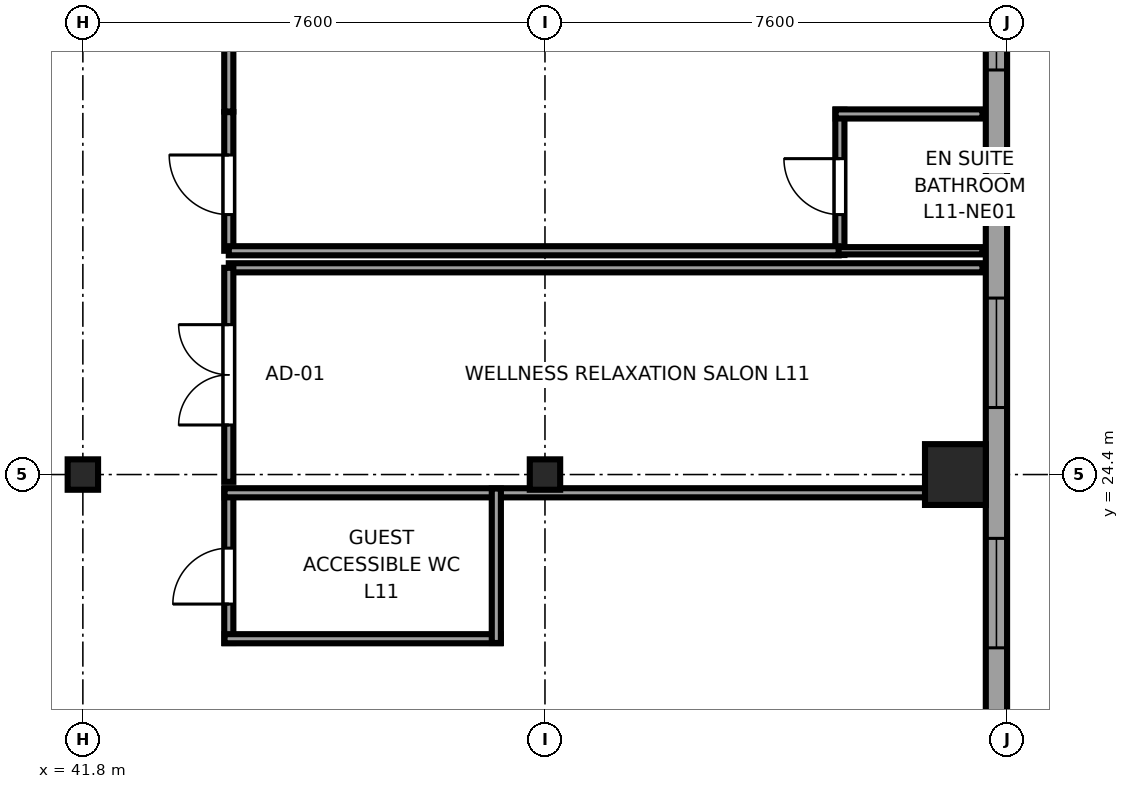
"""IFC4 building model, lengths in metres.
Left out: names, types, materials, properties, quantities, classifications, styles, units other than length and angle.
Written with IfcOpenShell. Run it as: python <this file> out.ifc"""

import sys

from ifc_helpers import new_model, si_unit, direction, frame, frame_2d, origin, origin_2d, place, context, subcontext, project, spatial, rectangle, i_section, extrude, source, transform, mapped, element, fill, save


model = new_model("IFC4")
c1 = context("Model", 3, precision=1e-05, world=origin(), true_north=direction((0.0, 1.0)))
c2 = subcontext(c1, "Body", "Model", "MODEL_VIEW")
j1 = project(units=[si_unit("LENGTHUNIT", "METRE"), si_unit("PLANEANGLEUNIT", "RADIAN")], contexts=[c1])
p1 = place(None, origin())
s1 = spatial("IfcSite", under=j1, at=p1, CompositionType="ELEMENT")
p2 = place(p1, origin())
s2 = spatial("IfcBuilding", under=s1, at=p2, CompositionType="ELEMENT")
p3 = place(p2, frame((0.0, 0.0, 49.75)))
s3 = spatial("IfcBuildingStorey", under=s2, at=p3, CompositionType="ELEMENT", Elevation=49.75)
m1 = source(origin(), c2, "Body", "SweptSolid", [
    extrude(i_section(OverallWidth=0.5, OverallDepth=0.5, WebThickness=0.028, FlangeThickness=0.045, at=origin_2d()), origin(), (0.0, 0.0, 1.0), 3.55),
])
for number, where, z_axis, x_axis in (
    (1, (41.8, 24.4, 0.0), (0.0, 0.0, 1.0), (1.0, 0.0, 0.0)),
    (2, (49.4, 24.4, 0.0), (0.0, 0.0, 1.0), (1.0, 0.0, 0.0)),
):
    element("IfcColumn", number, at=place(p3, frame(where, z_axis=z_axis, x_axis=x_axis)), inside=s3, PredefinedType="COLUMN", context=c2, shape_type="MappedRepresentation", body=[
        mapped(m1, transform((0.0, 0.0, 0.0), x_axis=(1.0, 0.0, 0.0), y_axis=(0.0, 1.0, 0.0), z_axis=(0.0, 0.0, 1.0), scale=1.0)),
    ])
m2 = source(origin(), c2, "Body", "SweptSolid", [
    extrude(rectangle(XDim=1.0, YDim=1.0, at=origin_2d()), origin(), (0.0, 0.0, 1.0), 3.55),
])
p4 = place(p3, frame((56.15, 24.4, 0.0), z_axis=(0.0, 0.0, 1.0), x_axis=(1.0, 0.0, 0.0)))
e3 = element("IfcColumn", 3, at=p4, inside=s3, PredefinedType="COLUMN", context=c2, shape_type="MappedRepresentation", body=[
    mapped(m2, transform((0.0, 0.0, 0.0), x_axis=(1.0, 0.0, 0.0), y_axis=(0.0, 1.0, 0.0), z_axis=(0.0, 0.0, 1.0), scale=1.0)),
])
p5 = place(p3, frame((56.825, 4.617, 0.0), z_axis=(0.0, 0.0, 1.0), x_axis=(0.0, 1.0, 0.0)))
e4 = element("IfcWall", 4, at=p5, inside=s3, PredefinedType="SOLIDWALL", context=c2, shape_type="SweptSolid", body=[
    extrude(rectangle(XDim=36.766, YDim=0.35, at=frame_2d((18.383, 0.0))), origin(), (0.0, 0.0, 1.0), 3.37),
])
p6 = place(p5, frame((5.628, 0.0, 0.68)))
e5 = element("IfcOpeningElement", 5, at=p6, cuts=e4, PredefinedType="OPENING", context=c2, shape_type="SweptSolid", body=[
    extrude(rectangle(XDim=1.8, YDim=1.85, at=frame_2d((0.9, 0.925))), frame((0.0, 0.185, 0.0), z_axis=(0.0, -1.0, 0.0), x_axis=(1.0, 0.0, 0.0)), (0.0, 0.0, 1.0), 0.37),
])
p7 = place(p5, frame((12.481, 0.0, 0.68)))
e6 = element("IfcOpeningElement", 6, at=p7, cuts=e4, PredefinedType="OPENING", context=c2, shape_type="SweptSolid", body=[
    extrude(rectangle(XDim=1.8, YDim=1.85, at=frame_2d((0.9, 0.925))), frame((0.0, 0.185, 0.0), z_axis=(0.0, -1.0, 0.0), x_axis=(1.0, 0.0, 0.0)), (0.0, 0.0, 1.0), 0.37),
])
p8 = place(p5, frame((16.933, 0.0, 0.68)))
e7 = element("IfcOpeningElement", 7, at=p8, cuts=e4, PredefinedType="OPENING", context=c2, shape_type="SweptSolid", body=[
    extrude(rectangle(XDim=1.8, YDim=1.85, at=frame_2d((0.9, 0.925))), frame((0.0, 0.185, 0.0), z_axis=(0.0, -1.0, 0.0), x_axis=(1.0, 0.0, 0.0)), (0.0, 0.0, 1.0), 0.37),
])
p9 = place(p5, frame((20.885, 0.0, 0.68)))
e8 = element("IfcOpeningElement", 8, at=p9, cuts=e4, PredefinedType="OPENING", context=c2, shape_type="SweptSolid", body=[
    extrude(rectangle(XDim=1.8, YDim=1.85, at=frame_2d((0.9, 0.925))), frame((0.0, 0.185, 0.0), z_axis=(0.0, -1.0, 0.0), x_axis=(1.0, 0.0, 0.0)), (0.0, 0.0, 1.0), 0.37),
])
p10 = place(p5, frame((26.436, 0.0, 0.68)))
e9 = element("IfcOpeningElement", 9, at=p10, cuts=e4, PredefinedType="OPENING", context=c2, shape_type="SweptSolid", body=[
    extrude(rectangle(XDim=1.8, YDim=1.85, at=frame_2d((0.9, 0.925))), frame((0.0, 0.185, 0.0), z_axis=(0.0, -1.0, 0.0), x_axis=(1.0, 0.0, 0.0)), (0.0, 0.0, 1.0), 0.37),
])
p11 = place(p5, frame((30.388, 0.0, 0.68)))
e10 = element("IfcOpeningElement", 10, at=p11, cuts=e4, PredefinedType="OPENING", context=c2, shape_type="SweptSolid", body=[
    extrude(rectangle(XDim=1.8, YDim=1.85, at=frame_2d((0.9, 0.925))), frame((0.0, 0.185, 0.0), z_axis=(0.0, -1.0, 0.0), x_axis=(1.0, 0.0, 0.0)), (0.0, 0.0, 1.0), 0.37),
])
p12 = place(p5, frame((33.29, 0.0, 0.68)))
e11 = element("IfcOpeningElement", 11, at=p12, cuts=e4, PredefinedType="OPENING", context=c2, shape_type="SweptSolid", body=[
    extrude(rectangle(XDim=1.8, YDim=1.85, at=frame_2d((0.9, 0.925))), frame((0.0, 0.185, 0.0), z_axis=(0.0, -1.0, 0.0), x_axis=(1.0, 0.0, 0.0)), (0.0, 0.0, 1.0), 0.37),
])
p13 = place(p3, frame((54.25, 28.01, 0.0), z_axis=(0.0, 0.0, 1.0), x_axis=(0.0, 1.0, 0.0)))
e12 = element("IfcWall", 12, at=p13, inside=s3, PredefinedType="PARTITIONING", context=c2, shape_type="SweptSolid", body=[
    extrude(rectangle(XDim=2.39, YDim=0.15, at=frame_2d((1.195, 0.0))), origin(), (0.0, 0.0, 1.0), 3.37),
])
p14 = place(p13, frame((0.665, 0.0, 0.0)))
e13 = element("IfcOpeningElement", 13, at=p14, cuts=e12, PredefinedType="OPENING", context=c2, shape_type="SweptSolid", body=[
    extrude(rectangle(XDim=0.92, YDim=2.01, at=frame_2d((0.46, 1.005))), frame((0.0, 0.085, 0.0), z_axis=(0.0, -1.0, 0.0), x_axis=(1.0, 0.0, 0.0)), (0.0, 0.0, 1.0), 0.17),
])
p15 = place(p3, frame((54.18, 28.08, 0.0), z_axis=(0.0, 0.0, 1.0), x_axis=(1.0, 0.0, 0.0)))
e14 = element("IfcWall", 14, at=p15, inside=s3, PredefinedType="PLUMBINGWALL", context=c2, shape_type="SweptSolid", body=[
    extrude(rectangle(XDim=2.415, YDim=0.12, at=frame_2d((1.208, 0.0))), origin(), (0.0, 0.0, 1.0), 3.37),
])
p16 = place(p3, frame((54.18, 30.33, 0.0), z_axis=(0.0, 0.0, 1.0), x_axis=(1.0, 0.0, 0.0)))
e15 = element("IfcWall", 15, at=p16, inside=s3, PredefinedType="PARTITIONING", context=c2, shape_type="SweptSolid", body=[
    extrude(rectangle(XDim=2.415, YDim=0.15, at=frame_2d((1.208, 0.0))), origin(), (0.0, 0.0, 1.0), 3.37),
])
p17 = place(p3, frame((44.2, 21.63, 0.0), z_axis=(0.0, 0.0, 1.0), x_axis=(0.0, 1.0, 0.0)))
e16 = element("IfcWall", 16, at=p17, inside=s3, PredefinedType="PARTITIONING", context=c2, shape_type="SweptSolid", body=[
    extrude(rectangle(XDim=2.54, YDim=0.15, at=frame_2d((1.27, 0.0))), origin(), (0.0, 0.0, 1.0), 3.37),
])
p18 = place(p17, frame((0.64, 0.0, 0.0)))
e17 = element("IfcOpeningElement", 17, at=p18, cuts=e16, PredefinedType="OPENING", context=c2, shape_type="SweptSolid", body=[
    extrude(rectangle(XDim=0.92, YDim=2.01, at=frame_2d((0.46, 1.005))), frame((0.0, 0.085, 0.0), z_axis=(0.0, -1.0, 0.0), x_axis=(1.0, 0.0, 0.0)), (0.0, 0.0, 1.0), 0.17),
])
p19 = place(p3, frame((44.13, 21.7, 0.0), z_axis=(0.0, 0.0, 1.0), x_axis=(1.0, 0.0, 0.0)))
e18 = element("IfcWall", 18, at=p19, inside=s3, PredefinedType="PARTITIONING", context=c2, shape_type="SweptSolid", body=[
    extrude(rectangle(XDim=4.54, YDim=0.15, at=frame_2d((2.27, 0.0))), origin(), (0.0, 0.0, 1.0), 3.37),
])
p20 = place(p3, frame((44.13, 24.1, 0.0), z_axis=(0.0, 0.0, 1.0), x_axis=(1.0, 0.0, 0.0)))
e19 = element("IfcWall", 19, at=p20, inside=s3, PredefinedType="PARTITIONING", context=c2, shape_type="SweptSolid", body=[
    extrude(rectangle(XDim=12.465, YDim=0.15, at=frame_2d((6.232, 0.0))), origin(), (0.0, 0.0, 1.0), 3.37),
])
p21 = place(p3, frame((48.6, 21.63, 0.0), z_axis=(0.0, 0.0, 1.0), x_axis=(0.0, 1.0, 0.0)))
e20 = element("IfcWall", 20, at=p21, inside=s3, PredefinedType="PARTITIONING", context=c2, shape_type="SweptSolid", body=[
    extrude(rectangle(XDim=2.54, YDim=0.15, at=frame_2d((1.27, 0.0))), origin(), (0.0, 0.0, 1.0), 3.37),
])
p22 = place(p3, frame((44.2, 27.8, 0.0), z_axis=(0.0, 0.0, 1.0), x_axis=(1.0, 0.0, 0.0)))
e21 = element("IfcWall", 21, at=p22, inside=s3, PredefinedType="PARTITIONING", context=c2, shape_type="SweptSolid", body=[
    extrude(rectangle(XDim=12.395, YDim=0.15, at=frame_2d((6.198, 0.0))), origin(), (0.0, 0.0, 1.0), 3.37),
])
p23 = place(p3, frame((44.2, 24.28, 0.0), z_axis=(0.0, 0.0, 1.0), x_axis=(0.0, 1.0, 0.0)))
e22 = element("IfcWall", 22, at=p23, inside=s3, PredefinedType="PARTITIONING", context=c2, shape_type="SweptSolid", body=[
    extrude(rectangle(XDim=3.52, YDim=0.15, at=frame_2d((1.76, 0.0))), origin(), (0.0, 0.0, 1.0), 3.37),
])
p24 = place(p23, frame((0.935, 0.0, 0.0)))
e23 = element("IfcOpeningElement", 23, at=p24, cuts=e22, PredefinedType="OPENING", context=c2, shape_type="SweptSolid", body=[
    extrude(rectangle(XDim=1.65, YDim=2.15, at=frame_2d((0.825, 1.075))), frame((0.0, 0.085, 0.0), z_axis=(0.0, -1.0, 0.0), x_axis=(1.0, 0.0, 0.0)), (0.0, 0.0, 1.0), 0.17),
])
p25 = place(p3, frame((44.2, 28.08, 0.0), z_axis=(0.0, 0.0, 1.0), x_axis=(0.0, 1.0, 0.0)))
e24 = element("IfcWall", 24, at=p25, inside=s3, PredefinedType="PARTITIONING", context=c2, shape_type="SweptSolid", body=[
    extrude(rectangle(XDim=2.28, YDim=0.15, at=frame_2d((1.14, 0.0))), origin(), (0.0, 0.0, 1.0), 3.37),
])
p26 = place(p25, frame((0.595, 0.0, 0.0)))
e25 = element("IfcOpeningElement", 25, at=p26, cuts=e24, PredefinedType="OPENING", context=c2, shape_type="SweptSolid", body=[
    extrude(rectangle(XDim=0.98, YDim=2.12, at=frame_2d((0.49, 1.06))), frame((0.0, 0.085, 0.0), z_axis=(0.0, -1.0, 0.0), x_axis=(1.0, 0.0, 0.0)), (0.0, 0.0, 1.0), 0.17),
])
p27 = place(p3, frame((44.2, 28.08, 0.0), z_axis=(0.0, 0.0, 1.0), x_axis=(1.0, 0.0, 0.0)))
e26 = element("IfcWall", 26, at=p27, inside=s3, PredefinedType="PARTITIONING", context=c2, shape_type="SweptSolid", body=[
    extrude(rectangle(XDim=10.03, YDim=0.15, at=frame_2d((5.015, 0.0))), origin(), (0.0, 0.0, 1.0), 3.37),
])
p28 = place(p3, frame((44.2, 30.37, 0.0), z_axis=(0.0, 0.0, 1.0), x_axis=(0.0, 1.0, 0.0)))
e27 = element("IfcWall", 27, at=p28, inside=s3, PredefinedType="PARTITIONING", context=c2, shape_type="SweptSolid", body=[
    extrude(rectangle(XDim=15.225, YDim=0.15, at=frame_2d((7.612, 0.0))), origin(), (0.0, 0.0, 1.0), 3.37),
])
m3 = source(origin(), c2, "Body", "SweptSolid", [
    extrude(rectangle(XDim=1.8, YDim=1.85, at=frame_2d((0.9, 0.925))), frame((0.0, 0.09, 0.0), z_axis=(0.0, -1.0, 0.0), x_axis=(1.0, 0.0, 0.0)), (0.0, 0.0, 1.0), 0.06),
])
p29 = place(p8, origin())
e28 = element("IfcWindow", 28, at=p29, inside=s3, PartitioningType="TRIPLE_PANEL_HORIZONTAL", PredefinedType="WINDOW", context=c2, shape_type="MappedRepresentation", body=[
    mapped(m3, transform((0.0, 0.0, 0.0), x_axis=(1.0, 0.0, 0.0), y_axis=(0.0, 1.0, 0.0), z_axis=(0.0, 0.0, 1.0), scale=1.0)),
])
fill(e7, e28)
p30 = place(p9, origin())
e29 = element("IfcWindow", 29, at=p30, inside=s3, PartitioningType="TRIPLE_PANEL_HORIZONTAL", PredefinedType="WINDOW", context=c2, shape_type="MappedRepresentation", body=[
    mapped(m3, transform((0.0, 0.0, 0.0), x_axis=(1.0, 0.0, 0.0), y_axis=(0.0, 1.0, 0.0), z_axis=(0.0, 0.0, 1.0), scale=1.0)),
])
fill(e8, e29)
p31 = place(p10, origin())
e30 = element("IfcWindow", 30, at=p31, inside=s3, PartitioningType="TRIPLE_PANEL_HORIZONTAL", PredefinedType="WINDOW", context=c2, shape_type="MappedRepresentation", body=[
    mapped(m3, transform((0.0, 0.0, 0.0), x_axis=(1.0, 0.0, 0.0), y_axis=(0.0, 1.0, 0.0), z_axis=(0.0, 0.0, 1.0), scale=1.0)),
])
fill(e9, e30)
m4 = source(origin(), c2, "Body", "SweptSolid", [
    extrude(rectangle(XDim=0.92, YDim=2.01, at=frame_2d((0.46, 1.005))), frame((0.0, 0.025, 0.0), z_axis=(0.0, -1.0, 0.0), x_axis=(1.0, 0.0, 0.0)), (0.0, 0.0, 1.0), 0.05),
])
p32 = place(p14, origin())
e31 = element("IfcDoor", 31, at=p32, inside=s3, OperationType="SINGLE_SWING_RIGHT", PredefinedType="DOOR", context=c2, shape_type="MappedRepresentation", body=[
    mapped(m4, transform((0.0, 0.0, 0.0), x_axis=(1.0, 0.0, 0.0), y_axis=(0.0, 1.0, 0.0), z_axis=(0.0, 0.0, 1.0), scale=1.0)),
])
fill(e13, e31)
p33 = place(p18, origin())
e32 = element("IfcDoor", 32, at=p33, inside=s3, OperationType="SINGLE_SWING_LEFT", PredefinedType="DOOR", context=c2, shape_type="MappedRepresentation", body=[
    mapped(m4, transform((0.0, 0.0, 0.0), x_axis=(1.0, 0.0, 0.0), y_axis=(0.0, 1.0, 0.0), z_axis=(0.0, 0.0, 1.0), scale=1.0)),
])
fill(e17, e32)
m5 = source(origin(), c2, "Body", "SweptSolid", [
    extrude(rectangle(XDim=1.65, YDim=2.15, at=frame_2d((0.825, 1.075))), frame((0.0, 0.025, 0.0), z_axis=(0.0, -1.0, 0.0), x_axis=(1.0, 0.0, 0.0)), (0.0, 0.0, 1.0), 0.05),
])
p34 = place(p24, origin())
e33 = element("IfcDoor", 33, at=p34, inside=s3, OperationType="DOUBLE_DOOR_SINGLE_SWING", PredefinedType="DOOR", context=c2, shape_type="MappedRepresentation", body=[
    mapped(m5, transform((0.0, 0.0, 0.0), x_axis=(1.0, 0.0, 0.0), y_axis=(0.0, 1.0, 0.0), z_axis=(0.0, 0.0, 1.0), scale=1.0)),
])
fill(e23, e33)
m6 = source(origin(), c2, "Body", "SweptSolid", [
    extrude(rectangle(XDim=0.98, YDim=2.12, at=frame_2d((0.49, 1.06))), frame((0.0, 0.025, 0.0), z_axis=(0.0, -1.0, 0.0), x_axis=(1.0, 0.0, 0.0)), (0.0, 0.0, 1.0), 0.05),
])
p35 = place(p26, origin())
e34 = element("IfcDoor", 34, at=p35, inside=s3, OperationType="SINGLE_SWING_RIGHT", PredefinedType="DOOR", context=c2, shape_type="MappedRepresentation", body=[
    mapped(m6, transform((0.0, 0.0, 0.0), x_axis=(1.0, 0.0, 0.0), y_axis=(0.0, 1.0, 0.0), z_axis=(0.0, 0.0, 1.0), scale=1.0)),
])
fill(e25, e34)
save(model, sys.argv[1])
